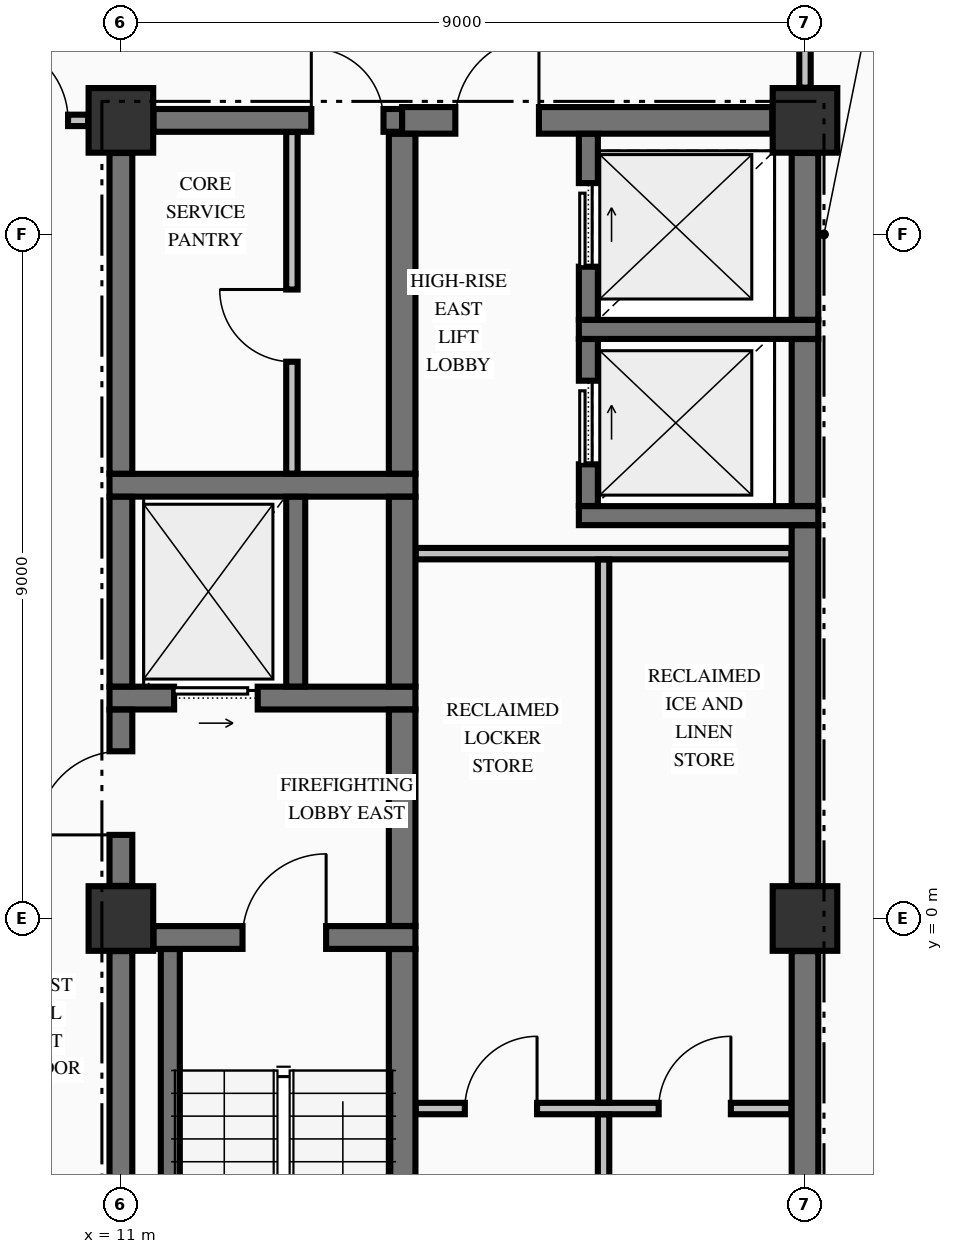
"""IFC4 building model, lengths in metres.
Left out: names, types, materials, properties, quantities, classifications, styles, units other than length and angle.
Written with IfcOpenShell. Run it as: python <this file> out.ifc"""

import sys

from ifc_helpers import new_model, si_unit, direction, frame, frame_2d, origin, origin_2d, place, context, subcontext, project, spatial, rectangle, extrude, element, fill, save


model = new_model("IFC4")
c1 = context("Model", 3, precision=1e-05, world=origin(), true_north=direction((0.0, 1.0)))
c2 = subcontext(c1, "Body", "Model", "MODEL_VIEW")
j1 = project(units=[si_unit("LENGTHUNIT", "METRE"), si_unit("PLANEANGLEUNIT", "RADIAN")], contexts=[c1])
p1 = place(None, origin())
s1 = spatial("IfcSite", under=j1, at=p1, CompositionType="ELEMENT")
p2 = place(p1, origin())
s2 = spatial("IfcBuilding", under=s1, at=p2, CompositionType="ELEMENT")
p3 = place(p2, frame((0.0, 0.0, 215.26)))
s3 = spatial("IfcBuildingStorey", under=s2, at=p3, CompositionType="ELEMENT", Elevation=215.26)
for number, where, z_axis, x_axis in (
    (1, (11.0, 0.0, -0.25), (0.0, 0.0, 1.0), (1.0, 0.0, 0.0)),
    (2, (11.0, 10.5, -0.25), (0.0, 0.0, 1.0), (1.0, 0.0, 0.0)),
    (3, (20.0, 10.5, -0.25), (0.0, 0.0, 1.0), (1.0, 0.0, 0.0)),
    (4, (20.0, 0.0, -0.25), (0.0, 0.0, 1.0), (1.0, 0.0, 0.0)),
):
    element("IfcColumn", number, at=place(p3, frame(where, z_axis=z_axis, x_axis=x_axis)), inside=s3, PredefinedType="COLUMN", context=c2, shape_type="SweptSolid", body=[
        extrude(rectangle(XDim=0.85, YDim=0.85, at=origin_2d()), origin(), (0.0, 0.0, 1.0), 3.4),
    ])
p4 = place(p3, frame((11.429, -0.25, 0.0), z_axis=(0.0, 0.0, 1.0), x_axis=(1.0, 0.0, 0.0)))
e5 = element("IfcWall", 5, at=p4, inside=s3, PredefinedType="SHEAR", context=c2, shape_type="SweptSolid", body=[
    extrude(rectangle(XDim=3.446, YDim=0.3, at=frame_2d((1.723, 0.0))), origin(), (0.0, 0.0, 1.0), 3.15),
])
p5 = place(p4, frame((1.171, 0.0, 0.0)))
e6 = element("IfcOpeningElement", 6, at=p5, cuts=e5, PredefinedType="OPENING", context=c2, shape_type="SweptSolid", body=[
    extrude(rectangle(XDim=1.1, YDim=2.15, at=frame_2d((0.55, 1.075))), frame((0.0, 0.16, 0.0), z_axis=(0.0, -1.0, 0.0), x_axis=(1.0, 0.0, 0.0)), (0.0, 0.0, 1.0), 0.32),
])
p6 = place(p3, frame((10.85, 2.9, 0.0), z_axis=(0.0, 0.0, 1.0), x_axis=(1.0, 0.0, 0.0)))
e7 = element("IfcWall", 7, at=p6, inside=s3, PredefinedType="SHEAR", context=c2, shape_type="SweptSolid", body=[
    extrude(rectangle(XDim=4.025, YDim=0.3, at=frame_2d((2.012, 0.0))), origin(), (0.0, 0.0, 1.0), 3.15),
])
p7 = place(p6, frame((0.85, 0.0, 0.0)))
e8 = element("IfcOpeningElement", 8, at=p7, cuts=e7, PredefinedType="OPENING", context=c2, shape_type="SweptSolid", body=[
    extrude(rectangle(XDim=1.1, YDim=2.2, at=frame_2d((0.55, 1.1))), frame((0.0, 0.16, 0.0), z_axis=(0.0, -1.0, 0.0), x_axis=(1.0, 0.0, 0.0)), (0.0, 0.0, 1.0), 0.32),
])
p8 = place(p3, frame((17.025, 5.3, 0.0), z_axis=(0.0, 0.0, 1.0), x_axis=(1.0, 0.0, 0.0)))
e9 = element("IfcWall", 9, at=p8, inside=s3, PredefinedType="SOLIDWALL", context=c2, shape_type="SweptSolid", body=[
    extrude(rectangle(XDim=3.15, YDim=0.25, at=frame_2d((1.575, 0.0))), origin(), (0.0, 0.0, 1.0), 3.15),
])
p9 = place(p3, frame((10.85, 5.7, 0.0), z_axis=(0.0, 0.0, 1.0), x_axis=(1.0, 0.0, 0.0)))
e10 = element("IfcWall", 10, at=p9, inside=s3, PredefinedType="SHEAR", context=c2, shape_type="SweptSolid", body=[
    extrude(rectangle(XDim=4.025, YDim=0.3, at=frame_2d((2.012, 0.0))), origin(), (0.0, 0.0, 1.0), 3.15),
])
p10 = place(p3, frame((17.025, 7.75, 0.0), z_axis=(0.0, 0.0, 1.0), x_axis=(1.0, 0.0, 0.0)))
e11 = element("IfcWall", 11, at=p10, inside=s3, PredefinedType="SOLIDWALL", context=c2, shape_type="SweptSolid", body=[
    extrude(rectangle(XDim=3.15, YDim=0.25, at=frame_2d((1.575, 0.0))), origin(), (0.0, 0.0, 1.0), 3.15),
])
p11 = place(p3, frame((11.429, 10.5, 0.0), z_axis=(0.0, 0.0, 1.0), x_axis=(1.0, 0.0, 0.0)))
e12 = element("IfcWall", 12, at=p11, inside=s3, PredefinedType="SHEAR", context=c2, shape_type="SweptSolid", body=[
    extrude(rectangle(XDim=3.271, YDim=0.3, at=frame_2d((1.635, 0.0))), origin(), (0.0, 0.0, 1.0), 3.15),
])
p12 = place(p11, frame((2.076, 0.0, 0.0)))
e13 = element("IfcOpeningElement", 13, at=p12, cuts=e12, PredefinedType="OPENING", context=c2, shape_type="SweptSolid", body=[
    extrude(rectangle(XDim=0.95, YDim=2.15, at=frame_2d((0.475, 1.075))), frame((0.0, 0.16, 0.0), z_axis=(0.0, -1.0, 0.0), x_axis=(1.0, 0.0, 0.0)), (0.0, 0.0, 1.0), 0.32),
])
p13 = place(p3, frame((14.7, 10.5, 0.0), z_axis=(0.0, 0.0, 1.0), x_axis=(1.0, 0.0, 0.0)))
e14 = element("IfcWall", 14, at=p13, inside=s3, PredefinedType="SHEAR", context=c2, shape_type="SweptSolid", body=[
    extrude(rectangle(XDim=4.871, YDim=0.35, at=frame_2d((2.436, 0.0))), origin(), (0.0, 0.0, 1.0), 3.15),
])
p14 = place(p13, frame((0.7, 0.0, 0.0)))
e15 = element("IfcOpeningElement", 15, at=p14, cuts=e14, PredefinedType="OPENING", context=c2, shape_type="SweptSolid", body=[
    extrude(rectangle(XDim=1.1, YDim=2.15, at=frame_2d((0.55, 1.075))), frame((0.0, 0.185, 0.0), z_axis=(0.0, -1.0, 0.0), x_axis=(1.0, 0.0, 0.0)), (0.0, 0.0, 1.0), 0.37),
])
p15 = place(p3, frame((14.878, -2.5, 0.0), z_axis=(0.0, 0.0, 1.0), x_axis=(1.0, 0.0, 0.0)))
e16 = element("IfcWall", 16, at=p15, inside=s3, PredefinedType="PARTITIONING", context=c2, shape_type="SweptSolid", body=[
    extrude(rectangle(XDim=4.944, YDim=0.15, at=frame_2d((2.472, 0.0))), origin(), (0.0, 0.0, 1.0), 3.15),
])
p16 = place(p15, frame((0.647, 0.0, 0.0)))
e17 = element("IfcOpeningElement", 17, at=p16, cuts=e16, PredefinedType="OPENING", context=c2, shape_type="SweptSolid", body=[
    extrude(rectangle(XDim=0.95, YDim=2.15, at=frame_2d((0.475, 1.075))), frame((0.0, 0.085, 0.0), z_axis=(0.0, -1.0, 0.0), x_axis=(1.0, 0.0, 0.0)), (0.0, 0.0, 1.0), 0.17),
])
p17 = place(p15, frame((3.197, 0.0, 0.0)))
e18 = element("IfcOpeningElement", 18, at=p17, cuts=e16, PredefinedType="OPENING", context=c2, shape_type="SweptSolid", body=[
    extrude(rectangle(XDim=0.95, YDim=2.15, at=frame_2d((0.475, 1.075))), frame((0.0, 0.085, 0.0), z_axis=(0.0, -1.0, 0.0), x_axis=(1.0, 0.0, 0.0)), (0.0, 0.0, 1.0), 0.17),
])
p18 = place(p3, frame((14.878, 4.8, 0.0), z_axis=(0.0, 0.0, 1.0), x_axis=(1.0, 0.0, 0.0)))
e19 = element("IfcWall", 19, at=p18, inside=s3, PredefinedType="PARTITIONING", context=c2, shape_type="SweptSolid", body=[
    extrude(rectangle(XDim=4.944, YDim=0.15, at=frame_2d((2.472, 0.0))), origin(), (0.0, 0.0, 1.0), 3.15),
])
p19 = place(p3, frame((-10.569, 10.5, 0.0), z_axis=(0.0, 0.0, 1.0), x_axis=(1.0, 0.0, 0.0)))
e20 = element("IfcWall", 20, at=p19, inside=s3, PredefinedType="PARTITIONING", context=c2, shape_type="SweptSolid", body=[
    extrude(rectangle(XDim=21.138, YDim=0.15, at=frame_2d((10.569, 0.0))), origin(), (0.0, 0.0, 1.0), 3.15),
])
p20 = place(p19, frame((0.264, 0.0, 0.0)))
e21 = element("IfcOpeningElement", 21, at=p20, cuts=e20, PredefinedType="OPENING", context=c2, shape_type="SweptSolid", body=[
    extrude(rectangle(XDim=1.05, YDim=2.15, at=frame_2d((0.525, 1.075))), frame((0.0, 0.085, 0.0), z_axis=(0.0, -1.0, 0.0), x_axis=(1.0, 0.0, 0.0)), (0.0, 0.0, 1.0), 0.17),
])
p21 = place(p19, frame((19.824, 0.0, 0.0)))
e22 = element("IfcOpeningElement", 22, at=p21, cuts=e20, PredefinedType="OPENING", context=c2, shape_type="SweptSolid", body=[
    extrude(rectangle(XDim=1.05, YDim=2.15, at=frame_2d((0.525, 1.075))), frame((0.0, 0.085, 0.0), z_axis=(0.0, -1.0, 0.0), x_axis=(1.0, 0.0, 0.0)), (0.0, 0.0, 1.0), 0.17),
])
p22 = place(p3, frame((11.0, -9.521, 0.0), z_axis=(0.0, 0.0, 1.0), x_axis=(0.0, 1.0, 0.0)))
e23 = element("IfcWall", 23, at=p22, inside=s3, PredefinedType="SHEAR", context=c2, shape_type="SweptSolid", body=[
    extrude(rectangle(XDim=9.092, YDim=0.3, at=frame_2d((4.546, 0.0))), origin(), (0.0, 0.0, 1.0), 3.15),
])
p23 = place(p3, frame((11.0, 0.429, 0.0), z_axis=(0.0, 0.0, 1.0), x_axis=(0.0, 1.0, 0.0)))
e24 = element("IfcWall", 24, at=p23, inside=s3, PredefinedType="SHEAR", context=c2, shape_type="SweptSolid", body=[
    extrude(rectangle(XDim=2.319, YDim=0.3, at=frame_2d((1.16, 0.0))), origin(), (0.0, 0.0, 1.0), 3.15),
])
p24 = place(p23, frame((0.671, 0.0, 0.0)))
e25 = element("IfcOpeningElement", 25, at=p24, cuts=e24, PredefinedType="OPENING", context=c2, shape_type="SweptSolid", body=[
    extrude(rectangle(XDim=1.1, YDim=2.15, at=frame_2d((0.55, 1.075))), frame((0.0, 0.16, 0.0), z_axis=(0.0, -1.0, 0.0), x_axis=(1.0, 0.0, 0.0)), (0.0, 0.0, 1.0), 0.32),
])
p25 = place(p3, frame((11.0, 3.052, 0.0), z_axis=(0.0, 0.0, 1.0), x_axis=(0.0, 1.0, 0.0)))
e26 = element("IfcWall", 26, at=p25, inside=s3, PredefinedType="SHEAR", context=c2, shape_type="SweptSolid", body=[
    extrude(rectangle(XDim=2.496, YDim=0.3, at=frame_2d((1.248, 0.0))), origin(), (0.0, 0.0, 1.0), 3.15),
])
p26 = place(p3, frame((11.0, 5.852, 0.0), z_axis=(0.0, 0.0, 1.0), x_axis=(0.0, 1.0, 0.0)))
e27 = element("IfcWall", 27, at=p26, inside=s3, PredefinedType="SHEAR", context=c2, shape_type="SweptSolid", body=[
    extrude(rectangle(XDim=4.219, YDim=0.3, at=frame_2d((2.109, 0.0))), origin(), (0.0, 0.0, 1.0), 3.15),
])
p27 = place(p3, frame((11.65, -9.798, 0.0), z_axis=(0.0, 0.0, 1.0), x_axis=(0.0, 1.0, 0.0)))
e28 = element("IfcWall", 28, at=p27, inside=s3, PredefinedType="SOLIDWALL", context=c2, shape_type="SweptSolid", body=[
    extrude(rectangle(XDim=9.396, YDim=0.25, at=frame_2d((4.698, 0.0))), origin(), (0.0, 0.0, 1.0), 3.15),
])
p28 = place(p3, frame((13.3, 3.052, 0.0), z_axis=(0.0, 0.0, 1.0), x_axis=(0.0, 1.0, 0.0)))
e29 = element("IfcWall", 29, at=p28, inside=s3, PredefinedType="SOLIDWALL", context=c2, shape_type="SweptSolid", body=[
    extrude(rectangle(XDim=2.496, YDim=0.25, at=frame_2d((1.248, 0.0))), origin(), (0.0, 0.0, 1.0), 3.15),
])
p29 = place(p3, frame((14.7, -9.773, 0.0), z_axis=(0.0, 0.0, 1.0), x_axis=(0.0, 1.0, 0.0)))
e30 = element("IfcWall", 30, at=p29, inside=s3, PredefinedType="SHEAR", context=c2, shape_type="SweptSolid", body=[
    extrude(rectangle(XDim=9.371, YDim=0.35, at=frame_2d((4.686, 0.0))), origin(), (0.0, 0.0, 1.0), 3.15),
])
p30 = place(p3, frame((14.7, -0.098, 0.0), z_axis=(0.0, 0.0, 1.0), x_axis=(0.0, 1.0, 0.0)))
e31 = element("IfcWall", 31, at=p30, inside=s3, PredefinedType="SHEAR", context=c2, shape_type="SweptSolid", body=[
    extrude(rectangle(XDim=2.846, YDim=0.35, at=frame_2d((1.423, 0.0))), origin(), (0.0, 0.0, 1.0), 3.15),
])
p31 = place(p3, frame((14.7, 3.052, 0.0), z_axis=(0.0, 0.0, 1.0), x_axis=(0.0, 1.0, 0.0)))
e32 = element("IfcWall", 32, at=p31, inside=s3, PredefinedType="SHEAR", context=c2, shape_type="SweptSolid", body=[
    extrude(rectangle(XDim=2.496, YDim=0.35, at=frame_2d((1.248, 0.0))), origin(), (0.0, 0.0, 1.0), 3.15),
])
p32 = place(p3, frame((14.7, 5.852, 0.0), z_axis=(0.0, 0.0, 1.0), x_axis=(0.0, 1.0, 0.0)))
e33 = element("IfcWall", 33, at=p32, inside=s3, PredefinedType="SHEAR", context=c2, shape_type="SweptSolid", body=[
    extrude(rectangle(XDim=4.471, YDim=0.35, at=frame_2d((2.235, 0.0))), origin(), (0.0, 0.0, 1.0), 3.15),
])
p33 = place(p3, frame((17.15, 5.427, 0.0), z_axis=(0.0, 0.0, 1.0), x_axis=(0.0, 1.0, 0.0)))
e34 = element("IfcWall", 34, at=p33, inside=s3, PredefinedType="SOLIDWALL", context=c2, shape_type="SweptSolid", body=[
    extrude(rectangle(XDim=2.196, YDim=0.25, at=frame_2d((1.098, 0.0))), origin(), (0.0, 0.0, 1.0), 3.15),
])
p34 = place(p33, frame((0.548, 0.0, 0.0)))
e35 = element("IfcOpeningElement", 35, at=p34, cuts=e34, PredefinedType="OPENING", context=c2, shape_type="SweptSolid", body=[
    extrude(rectangle(XDim=1.1, YDim=2.2, at=frame_2d((0.55, 1.1))), frame((0.0, 0.135, 0.0), z_axis=(0.0, -1.0, 0.0), x_axis=(1.0, 0.0, 0.0)), (0.0, 0.0, 1.0), 0.27),
])
p35 = place(p3, frame((17.15, 7.877, 0.0), z_axis=(0.0, 0.0, 1.0), x_axis=(0.0, 1.0, 0.0)))
e36 = element("IfcWall", 36, at=p35, inside=s3, PredefinedType="SOLIDWALL", context=c2, shape_type="SweptSolid", body=[
    extrude(rectangle(XDim=2.446, YDim=0.25, at=frame_2d((1.223, 0.0))), origin(), (0.0, 0.0, 1.0), 3.15),
])
p36 = place(p35, frame((0.698, 0.0, 0.0)))
e37 = element("IfcOpeningElement", 37, at=p36, cuts=e36, PredefinedType="OPENING", context=c2, shape_type="SweptSolid", body=[
    extrude(rectangle(XDim=1.1, YDim=2.2, at=frame_2d((0.55, 1.1))), frame((0.0, 0.135, 0.0), z_axis=(0.0, -1.0, 0.0), x_axis=(1.0, 0.0, 0.0)), (0.0, 0.0, 1.0), 0.27),
])
p37 = place(p3, frame((20.0, -9.521, 0.0), z_axis=(0.0, 0.0, 1.0), x_axis=(0.0, 1.0, 0.0)))
e38 = element("IfcWall", 38, at=p37, inside=s3, PredefinedType="SHEAR", context=c2, shape_type="SweptSolid", body=[
    extrude(rectangle(XDim=9.092, YDim=0.35, at=frame_2d((4.546, 0.0))), origin(), (0.0, 0.0, 1.0), 3.15),
])
p38 = place(p3, frame((20.0, 0.429, 0.0), z_axis=(0.0, 0.0, 1.0), x_axis=(0.0, 1.0, 0.0)))
e39 = element("IfcWall", 39, at=p38, inside=s3, PredefinedType="SHEAR", context=c2, shape_type="SweptSolid", body=[
    extrude(rectangle(XDim=4.744, YDim=0.35, at=frame_2d((2.372, 0.0))), origin(), (0.0, 0.0, 1.0), 3.15),
])
p39 = place(p3, frame((20.0, 5.427, 0.0), z_axis=(0.0, 0.0, 1.0), x_axis=(0.0, 1.0, 0.0)))
e40 = element("IfcWall", 40, at=p39, inside=s3, PredefinedType="SHEAR", context=c2, shape_type="SweptSolid", body=[
    extrude(rectangle(XDim=2.196, YDim=0.35, at=frame_2d((1.098, 0.0))), origin(), (0.0, 0.0, 1.0), 3.15),
])
p40 = place(p3, frame((20.0, 7.877, 0.0), z_axis=(0.0, 0.0, 1.0), x_axis=(0.0, 1.0, 0.0)))
e41 = element("IfcWall", 41, at=p40, inside=s3, PredefinedType="SHEAR", context=c2, shape_type="SweptSolid", body=[
    extrude(rectangle(XDim=2.194, YDim=0.35, at=frame_2d((1.097, 0.0))), origin(), (0.0, 0.0, 1.0), 3.15),
])
p41 = place(p3, frame((13.25, 5.853, 0.0), z_axis=(0.0, 0.0, 1.0), x_axis=(0.0, 1.0, 0.0)))
e42 = element("IfcWall", 42, at=p41, inside=s3, PredefinedType="PARTITIONING", context=c2, shape_type="SweptSolid", body=[
    extrude(rectangle(XDim=4.494, YDim=0.15, at=frame_2d((2.247, 0.0))), origin(), (0.0, 0.0, 1.0), 3.15),
])
p42 = place(p41, frame((1.472, 0.0, 0.0)))
e43 = element("IfcOpeningElement", 43, at=p42, cuts=e42, PredefinedType="OPENING", context=c2, shape_type="SweptSolid", body=[
    extrude(rectangle(XDim=0.95, YDim=2.15, at=frame_2d((0.475, 1.075))), frame((0.0, 0.085, 0.0), z_axis=(0.0, -1.0, 0.0), x_axis=(1.0, 0.0, 0.0)), (0.0, 0.0, 1.0), 0.17),
])
p43 = place(p3, frame((17.35, -9.772, 0.0), z_axis=(0.0, 0.0, 1.0), x_axis=(0.0, 1.0, 0.0)))
e44 = element("IfcWall", 44, at=p43, inside=s3, PredefinedType="PARTITIONING", context=c2, shape_type="SweptSolid", body=[
    extrude(rectangle(XDim=7.194, YDim=0.15, at=frame_2d((3.597, 0.0))), origin(), (0.0, 0.0, 1.0), 3.15),
])
p44 = place(p3, frame((17.35, -2.422, 0.0), z_axis=(0.0, 0.0, 1.0), x_axis=(0.0, 1.0, 0.0)))
e45 = element("IfcWall", 45, at=p44, inside=s3, PredefinedType="PARTITIONING", context=c2, shape_type="SweptSolid", body=[
    extrude(rectangle(XDim=7.144, YDim=0.15, at=frame_2d((3.572, 0.0))), origin(), (0.0, 0.0, 1.0), 3.15),
])
p45 = place(p3, frame((20.0, 10.931, 0.0), z_axis=(0.0, 0.0, 1.0), x_axis=(0.0, 1.0, 0.0)))
e46 = element("IfcWall", 46, at=p45, inside=s3, PredefinedType="PARTITIONING", context=c2, shape_type="SweptSolid", body=[
    extrude(rectangle(XDim=2.341, YDim=0.15, at=frame_2d((1.17, 0.0))), origin(), (0.0, 0.0, 1.0), 2.342),
])
p46 = place(p5, origin())
e47 = element("IfcDoor", 47, at=p46, inside=s3, OperationType="SINGLE_SWING_RIGHT", PredefinedType="DOOR", context=c2, shape_type="SweptSolid", body=[
    extrude(rectangle(XDim=1.1, YDim=2.15, at=frame_2d((0.55, 1.075))), frame((0.0, 0.025, 0.0), z_axis=(0.0, -1.0, 0.0), x_axis=(1.0, 0.0, 0.0)), (0.0, 0.0, 1.0), 0.05),
])
fill(e6, e47)
p47 = place(p24, origin())
e48 = element("IfcDoor", 48, at=p47, inside=s3, OperationType="SINGLE_SWING_LEFT", PredefinedType="DOOR", context=c2, shape_type="SweptSolid", body=[
    extrude(rectangle(XDim=1.1, YDim=2.15, at=frame_2d((0.55, 1.075))), frame((0.0, 0.025, 0.0), z_axis=(0.0, -1.0, 0.0), x_axis=(1.0, 0.0, 0.0)), (0.0, 0.0, 1.0), 0.05),
])
fill(e25, e48)
p48 = place(p7, origin())
e49 = element("IfcDoor", 49, at=p48, inside=s3, OperationType="SLIDING_TO_RIGHT", PredefinedType="DOOR", context=c2, shape_type="SweptSolid", body=[
    extrude(rectangle(XDim=1.1, YDim=2.2, at=frame_2d((0.55, 1.1))), frame((0.0, 0.025, 0.0), z_axis=(0.0, -1.0, 0.0), x_axis=(1.0, 0.0, 0.0)), (0.0, 0.0, 1.0), 0.05),
])
fill(e8, e49)
p49 = place(p12, origin())
e50 = element("IfcDoor", 50, at=p49, inside=s3, OperationType="SINGLE_SWING_LEFT", PredefinedType="DOOR", context=c2, shape_type="SweptSolid", body=[
    extrude(rectangle(XDim=0.95, YDim=2.15, at=frame_2d((0.475, 1.075))), frame((0.0, 0.025, 0.0), z_axis=(0.0, -1.0, 0.0), x_axis=(1.0, 0.0, 0.0)), (0.0, 0.0, 1.0), 0.05),
])
fill(e13, e50)
p50 = place(p42, origin())
e51 = element("IfcDoor", 51, at=p50, inside=s3, OperationType="SINGLE_SWING_RIGHT", PredefinedType="DOOR", context=c2, shape_type="SweptSolid", body=[
    extrude(rectangle(XDim=0.95, YDim=2.15, at=frame_2d((0.475, 1.075))), frame((0.0, 0.025, 0.0), z_axis=(0.0, -1.0, 0.0), x_axis=(1.0, 0.0, 0.0)), (0.0, 0.0, 1.0), 0.05),
])
fill(e43, e51)
p51 = place(p34, origin())
e52 = element("IfcDoor", 52, at=p51, inside=s3, OperationType="SLIDING_TO_RIGHT", PredefinedType="DOOR", context=c2, shape_type="SweptSolid", body=[
    extrude(rectangle(XDim=1.1, YDim=2.2, at=frame_2d((0.55, 1.1))), frame((0.0, 0.025, 0.0), z_axis=(0.0, -1.0, 0.0), x_axis=(1.0, 0.0, 0.0)), (0.0, 0.0, 1.0), 0.05),
])
fill(e35, e52)
p52 = place(p36, origin())
e53 = element("IfcDoor", 53, at=p52, inside=s3, OperationType="SLIDING_TO_RIGHT", PredefinedType="DOOR", context=c2, shape_type="SweptSolid", body=[
    extrude(rectangle(XDim=1.1, YDim=2.2, at=frame_2d((0.55, 1.1))), frame((0.0, 0.025, 0.0), z_axis=(0.0, -1.0, 0.0), x_axis=(1.0, 0.0, 0.0)), (0.0, 0.0, 1.0), 0.05),
])
fill(e37, e53)
p53 = place(p14, origin())
e54 = element("IfcDoor", 54, at=p53, inside=s3, OperationType="SINGLE_SWING_RIGHT", PredefinedType="DOOR", context=c2, shape_type="SweptSolid", body=[
    extrude(rectangle(XDim=1.1, YDim=2.15, at=frame_2d((0.55, 1.075))), frame((0.0, 0.025, 0.0), z_axis=(0.0, -1.0, 0.0), x_axis=(1.0, 0.0, 0.0)), (0.0, 0.0, 1.0), 0.05),
])
fill(e15, e54)
p54 = place(p16, origin())
e55 = element("IfcDoor", 55, at=p54, inside=s3, OperationType="SINGLE_SWING_RIGHT", PredefinedType="DOOR", context=c2, shape_type="SweptSolid", body=[
    extrude(rectangle(XDim=0.95, YDim=2.15, at=frame_2d((0.475, 1.075))), frame((0.0, 0.025, 0.0), z_axis=(0.0, -1.0, 0.0), x_axis=(1.0, 0.0, 0.0)), (0.0, 0.0, 1.0), 0.05),
])
fill(e17, e55)
p55 = place(p17, origin())
e56 = element("IfcDoor", 56, at=p55, inside=s3, OperationType="SINGLE_SWING_RIGHT", PredefinedType="DOOR", context=c2, shape_type="SweptSolid", body=[
    extrude(rectangle(XDim=0.95, YDim=2.15, at=frame_2d((0.475, 1.075))), frame((0.0, 0.025, 0.0), z_axis=(0.0, -1.0, 0.0), x_axis=(1.0, 0.0, 0.0)), (0.0, 0.0, 1.0), 0.05),
])
fill(e18, e56)
p56 = place(p21, origin())
e57 = element("IfcDoor", 57, at=p56, inside=s3, OperationType="SINGLE_SWING_LEFT", PredefinedType="DOOR", context=c2, shape_type="SweptSolid", body=[
    extrude(rectangle(XDim=1.05, YDim=2.15, at=frame_2d((0.525, 1.075))), frame((0.0, 0.025, 0.0), z_axis=(0.0, -1.0, 0.0), x_axis=(1.0, 0.0, 0.0)), (0.0, 0.0, 1.0), 0.05),
])
fill(e22, e57)
save(model, sys.argv[1])
